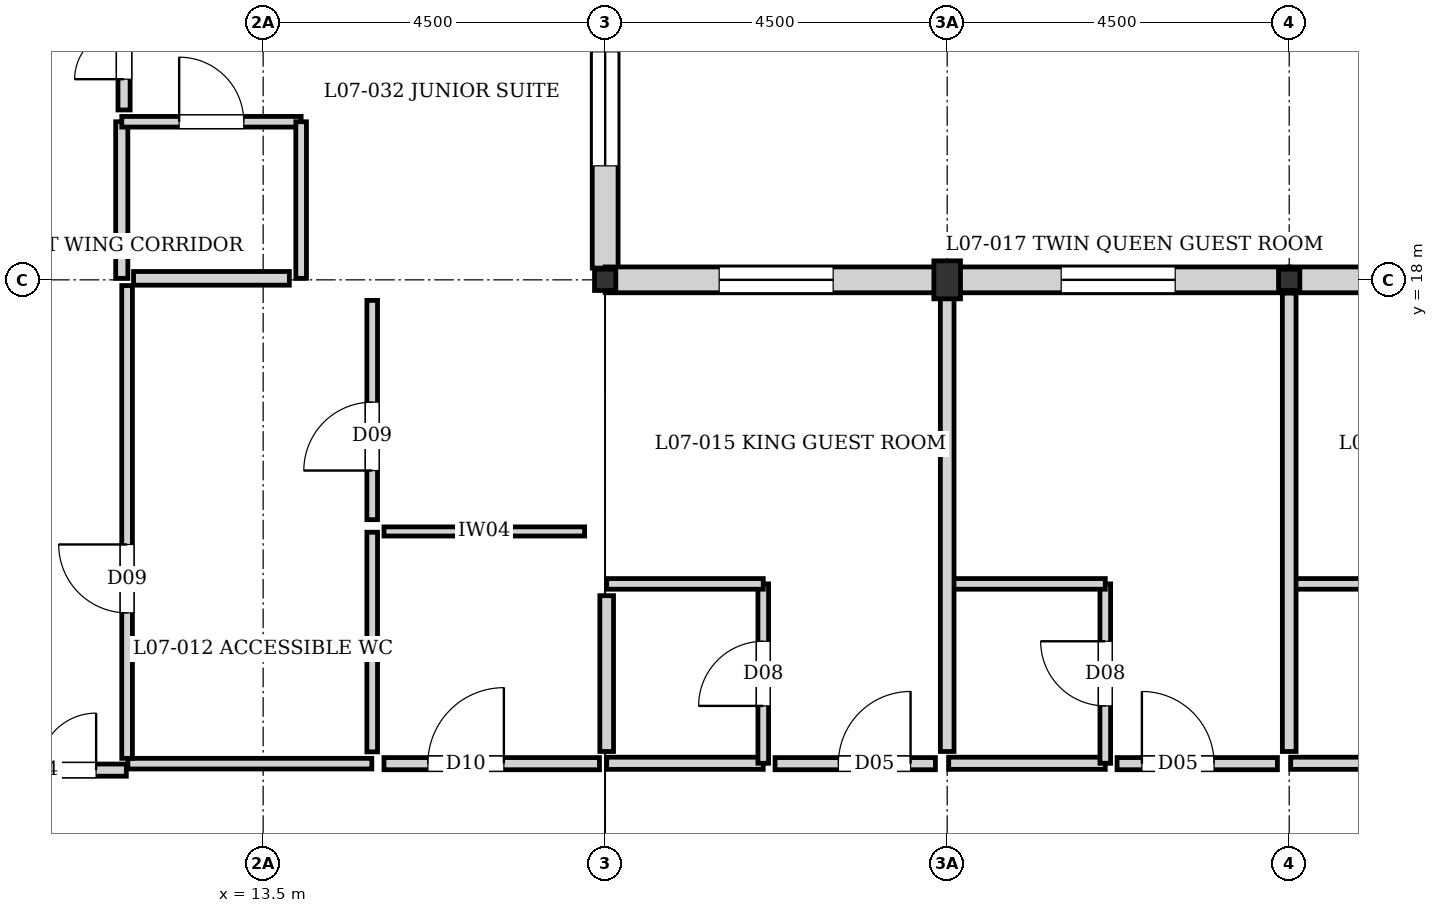
"""IFC4 building model, lengths in metres.
Left out: names, types, materials, properties, quantities, classifications, styles, units other than length and angle.
Written with IfcOpenShell. Run it as: python <this file> out.ifc"""

import sys

from ifc_helpers import new_model, si_unit, direction, frame, frame_2d, origin, origin_2d, place, context, subcontext, project, spatial, rectangle, i_section, extrude, element, fill, save


model = new_model("IFC4")
c1 = context("Model", 3, precision=1e-05, world=origin(), true_north=direction((0.0, 1.0)))
c2 = subcontext(c1, "Body", "Model", "MODEL_VIEW")
j1 = project(units=[si_unit("LENGTHUNIT", "METRE"), si_unit("PLANEANGLEUNIT", "RADIAN")], contexts=[c1])
p1 = place(None, origin())
s1 = spatial("IfcSite", under=j1, at=p1, CompositionType="ELEMENT")
p2 = place(p1, origin())
s2 = spatial("IfcBuilding", under=s1, at=p2, CompositionType="ELEMENT")
p3 = place(p2, frame((0.0, 0.0, 23.68)))
s3 = spatial("IfcBuildingStorey", under=s2, at=p3, CompositionType="ELEMENT", Elevation=23.68)
for number, where, z_axis, x_axis in (
    (1, (18.0, 18.0, 0.0), (0.0, 0.0, 1.0), (1.0, 0.0, 0.0)),
    (2, (27.0, 18.0, 0.0), (0.0, 0.0, 1.0), (1.0, 0.0, 0.0)),
):
    element("IfcColumn", number, at=place(p3, frame(where, z_axis=z_axis, x_axis=x_axis)), inside=s3, PredefinedType="COLUMN", context=c2, shape_type="SweptSolid", body=[
        extrude(i_section(OverallWidth=0.28, OverallDepth=0.28, WebThickness=0.01, FlangeThickness=0.018, at=origin_2d()), origin(), (0.0, 0.0, 1.0), 3.2),
    ])
p4 = place(p3, frame((22.5, 18.0, 0.0), z_axis=(0.0, 0.0, 1.0), x_axis=(1.0, 0.0, 0.0)))
e3 = element("IfcColumn", 3, at=p4, inside=s3, PredefinedType="PILASTER", context=c2, shape_type="SweptSolid", body=[
    extrude(rectangle(XDim=0.35, YDim=0.5, at=origin_2d()), origin(), (0.0, 0.0, 1.0), 3.2),
])
p5 = place(p3, frame((18.0, 27.0, 0.0), z_axis=(0.0, 0.0, 1.0), x_axis=(0.0, -1.0, 0.0)))
e4 = element("IfcWall", 4, at=p5, inside=s3, PredefinedType="SOLIDWALL", context=c2, shape_type="SweptSolid", body=[
    extrude(rectangle(XDim=8.845, YDim=0.34, at=frame_2d((4.422, 0.0))), origin(), (0.0, 0.0, 1.0), 2.96),
])
p6 = place(p5, frame((1.5, 0.0, 0.35)))
e5 = element("IfcOpeningElement", 5, at=p6, cuts=e4, PredefinedType="OPENING", context=c2, shape_type="SweptSolid", body=[
    extrude(rectangle(XDim=1.5, YDim=1.8, at=frame_2d((0.75, 0.9))), frame((0.0, 0.18, 0.0), z_axis=(0.0, -1.0, 0.0), x_axis=(1.0, 0.0, 0.0)), (0.0, 0.0, 1.0), 0.36),
])
p7 = place(p5, frame((6.0, 0.0, 0.35)))
e6 = element("IfcOpeningElement", 6, at=p7, cuts=e4, PredefinedType="OPENING", context=c2, shape_type="SweptSolid", body=[
    extrude(rectangle(XDim=1.5, YDim=1.8, at=frame_2d((0.75, 0.9))), frame((0.0, 0.18, 0.0), z_axis=(0.0, -1.0, 0.0), x_axis=(1.0, 0.0, 0.0)), (0.0, 0.0, 1.0), 0.36),
])
p8 = place(p3, frame((18.0, 18.0, 0.0), z_axis=(0.0, 0.0, 1.0), x_axis=(1.0, 0.0, 0.0)))
e7 = element("IfcWall", 7, at=p8, inside=s3, PredefinedType="SOLIDWALL", context=c2, shape_type="SweptSolid", body=[
    extrude(rectangle(XDim=9.0, YDim=0.34, at=frame_2d((4.5, 0.0))), origin(), (0.0, 0.0, 1.0), 2.56),
])
p9 = place(p8, frame((1.5, 0.0, 0.35)))
e8 = element("IfcOpeningElement", 8, at=p9, cuts=e7, PredefinedType="OPENING", context=c2, shape_type="SweptSolid", body=[
    extrude(rectangle(XDim=1.5, YDim=1.8, at=frame_2d((0.75, 0.9))), frame((0.0, 0.18, 0.0), z_axis=(0.0, -1.0, 0.0), x_axis=(1.0, 0.0, 0.0)), (0.0, 0.0, 1.0), 0.36),
])
p10 = place(p8, frame((6.0, 0.0, 0.35)))
e9 = element("IfcOpeningElement", 9, at=p10, cuts=e7, PredefinedType="OPENING", context=c2, shape_type="SweptSolid", body=[
    extrude(rectangle(XDim=1.5, YDim=1.8, at=frame_2d((0.75, 0.9))), frame((0.0, 0.18, 0.0), z_axis=(0.0, -1.0, 0.0), x_axis=(1.0, 0.0, 0.0)), (0.0, 0.0, 1.0), 0.36),
])
p11 = place(p3, frame((27.0, 18.0, 0.0), z_axis=(0.0, 0.0, 1.0), x_axis=(1.0, 0.0, 0.0)))
e10 = element("IfcWall", 10, at=p11, inside=s3, PredefinedType="SOLIDWALL", context=c2, shape_type="SweptSolid", body=[
    extrude(rectangle(XDim=9.0, YDim=0.34, at=frame_2d((4.5, 0.0))), origin(), (0.0, 0.0, 1.0), 2.73),
])
p12 = place(p11, frame((1.5, 0.0, 0.35)))
e11 = element("IfcOpeningElement", 11, at=p12, cuts=e10, PredefinedType="OPENING", context=c2, shape_type="SweptSolid", body=[
    extrude(rectangle(XDim=1.5, YDim=1.8, at=frame_2d((0.75, 0.9))), frame((0.0, 0.18, 0.0), z_axis=(0.0, -1.0, 0.0), x_axis=(1.0, 0.0, 0.0)), (0.0, 0.0, 1.0), 0.36),
])
p13 = place(p11, frame((6.0, 0.0, 0.35)))
e12 = element("IfcOpeningElement", 12, at=p13, cuts=e10, PredefinedType="OPENING", context=c2, shape_type="SweptSolid", body=[
    extrude(rectangle(XDim=1.5, YDim=1.8, at=frame_2d((0.75, 0.9))), frame((0.0, 0.18, 0.0), z_axis=(0.0, -1.0, 0.0), x_axis=(1.0, 0.0, 0.0)), (0.0, 0.0, 1.0), 0.36),
])
p14 = place(p3, frame((18.02, 11.64, 0.0), z_axis=(0.0, 0.0, 1.0), x_axis=(1.0, 0.0, 0.0)))
e13 = element("IfcWall", 13, at=p14, inside=s3, PredefinedType="PARTITIONING", context=c2, shape_type="SweptSolid", body=[
    extrude(rectangle(XDim=2.06, YDim=0.16, at=frame_2d((1.03, 0.0))), origin(), (0.0, 0.0, 1.0), 2.96),
])
p15 = place(p3, frame((20.08, 11.64, 0.0), z_axis=(0.0, 0.0, 1.0), x_axis=(0.0, 1.0, 0.0)))
e14 = element("IfcWall", 14, at=p15, inside=s3, PredefinedType="PLUMBINGWALL", context=c2, shape_type="SweptSolid", body=[
    extrude(rectangle(XDim=2.36, YDim=0.14, at=frame_2d((1.18, 0.0))), origin(), (0.0, 0.0, 1.0), 2.96),
])
p16 = place(p15, frame((0.755, 0.0, 0.0)))
e15 = element("IfcOpeningElement", 15, at=p16, cuts=e14, PredefinedType="OPENING", context=c2, shape_type="SweptSolid", body=[
    extrude(rectangle(XDim=0.85, YDim=2.04, at=frame_2d((0.425, 1.02))), frame((0.0, 0.08, 0.0), z_axis=(0.0, -1.0, 0.0), x_axis=(1.0, 0.0, 0.0)), (0.0, 0.0, 1.0), 0.16),
])
p17 = place(p3, frame((18.02, 14.0, 0.0), z_axis=(0.0, 0.0, 1.0), x_axis=(1.0, 0.0, 0.0)))
e16 = element("IfcWall", 16, at=p17, inside=s3, PredefinedType="PLUMBINGWALL", context=c2, shape_type="SweptSolid", body=[
    extrude(rectangle(XDim=2.06, YDim=0.14, at=frame_2d((1.03, 0.0))), origin(), (0.0, 0.0, 1.0), 2.96),
])
p18 = place(p3, frame((22.52, 11.64, 0.0), z_axis=(0.0, 0.0, 1.0), x_axis=(1.0, 0.0, 0.0)))
e17 = element("IfcWall", 17, at=p18, inside=s3, PredefinedType="PARTITIONING", context=c2, shape_type="SweptSolid", body=[
    extrude(rectangle(XDim=2.06, YDim=0.16, at=frame_2d((1.03, 0.0))), origin(), (0.0, 0.0, 1.0), 2.96),
])
p19 = place(p3, frame((24.58, 11.64, 0.0), z_axis=(0.0, 0.0, 1.0), x_axis=(0.0, 1.0, 0.0)))
e18 = element("IfcWall", 18, at=p19, inside=s3, PredefinedType="PLUMBINGWALL", context=c2, shape_type="SweptSolid", body=[
    extrude(rectangle(XDim=2.36, YDim=0.14, at=frame_2d((1.18, 0.0))), origin(), (0.0, 0.0, 1.0), 2.96),
])
p20 = place(p19, frame((0.755, 0.0, 0.0)))
e19 = element("IfcOpeningElement", 19, at=p20, cuts=e18, PredefinedType="OPENING", context=c2, shape_type="SweptSolid", body=[
    extrude(rectangle(XDim=0.85, YDim=2.04, at=frame_2d((0.425, 1.02))), frame((0.0, 0.08, 0.0), z_axis=(0.0, -1.0, 0.0), x_axis=(1.0, 0.0, 0.0)), (0.0, 0.0, 1.0), 0.16),
])
p21 = place(p3, frame((22.52, 14.0, 0.0), z_axis=(0.0, 0.0, 1.0), x_axis=(1.0, 0.0, 0.0)))
e20 = element("IfcWall", 20, at=p21, inside=s3, PredefinedType="PLUMBINGWALL", context=c2, shape_type="SweptSolid", body=[
    extrude(rectangle(XDim=2.06, YDim=0.14, at=frame_2d((1.03, 0.0))), origin(), (0.0, 0.0, 1.0), 2.96),
])
p22 = place(p3, frame((27.02, 11.64, 0.0), z_axis=(0.0, 0.0, 1.0), x_axis=(1.0, 0.0, 0.0)))
e21 = element("IfcWall", 21, at=p22, inside=s3, PredefinedType="PARTITIONING", context=c2, shape_type="SweptSolid", body=[
    extrude(rectangle(XDim=2.06, YDim=0.16, at=frame_2d((1.03, 0.0))), origin(), (0.0, 0.0, 1.0), 2.96),
])
p23 = place(p3, frame((27.02, 14.0, 0.0), z_axis=(0.0, 0.0, 1.0), x_axis=(1.0, 0.0, 0.0)))
e22 = element("IfcWall", 22, at=p23, inside=s3, PredefinedType="PLUMBINGWALL", context=c2, shape_type="SweptSolid", body=[
    extrude(rectangle(XDim=2.06, YDim=0.14, at=frame_2d((1.03, 0.0))), origin(), (0.0, 0.0, 1.0), 2.96),
])
p24 = place(p3, frame((11.64, 18.02, 0.0), z_axis=(0.0, 0.0, 1.0), x_axis=(0.0, 1.0, 0.0)))
e23 = element("IfcWall", 23, at=p24, inside=s3, PredefinedType="PARTITIONING", context=c2, shape_type="SweptSolid", body=[
    extrude(rectangle(XDim=2.06, YDim=0.16, at=frame_2d((1.03, 0.0))), origin(), (0.0, 0.0, 1.0), 2.96),
])
p25 = place(p3, frame((11.64, 20.08, 0.0), z_axis=(0.0, 0.0, 1.0), x_axis=(1.0, 0.0, 0.0)))
e24 = element("IfcWall", 24, at=p25, inside=s3, PredefinedType="PLUMBINGWALL", context=c2, shape_type="SweptSolid", body=[
    extrude(rectangle(XDim=2.36, YDim=0.14, at=frame_2d((1.18, 0.0))), origin(), (0.0, 0.0, 1.0), 2.96),
])
p26 = place(p25, frame((0.755, 0.0, 0.0)))
e25 = element("IfcOpeningElement", 25, at=p26, cuts=e24, PredefinedType="OPENING", context=c2, shape_type="SweptSolid", body=[
    extrude(rectangle(XDim=0.85, YDim=2.04, at=frame_2d((0.425, 1.02))), frame((0.0, 0.08, 0.0), z_axis=(0.0, -1.0, 0.0), x_axis=(1.0, 0.0, 0.0)), (0.0, 0.0, 1.0), 0.16),
])
p27 = place(p3, frame((14.0, 18.02, 0.0), z_axis=(0.0, 0.0, 1.0), x_axis=(0.0, 1.0, 0.0)))
e26 = element("IfcWall", 26, at=p27, inside=s3, PredefinedType="PLUMBINGWALL", context=c2, shape_type="SweptSolid", body=[
    extrude(rectangle(XDim=2.06, YDim=0.14, at=frame_2d((1.03, 0.0))), origin(), (0.0, 0.0, 1.0), 2.96),
])
p28 = place(p3, frame((22.5, 11.795, 0.0), z_axis=(0.0, 0.0, 1.0), x_axis=(0.0, 1.0, 0.0)))
e27 = element("IfcWall", 27, at=p28, inside=s3, PredefinedType="PARTITIONING", context=c2, shape_type="SweptSolid", body=[
    extrude(rectangle(XDim=6.03, YDim=0.18, at=frame_2d((3.015, 0.0))), origin(), (0.0, 0.0, 1.0), 2.96),
])
p29 = place(p3, frame((27.0, 11.795, 0.0), z_axis=(0.0, 0.0, 1.0), x_axis=(0.0, 1.0, 0.0)))
e28 = element("IfcWall", 28, at=p29, inside=s3, PredefinedType="PARTITIONING", context=c2, shape_type="SweptSolid", body=[
    extrude(rectangle(XDim=6.03, YDim=0.18, at=frame_2d((3.015, 0.0))), origin(), (0.0, 0.0, 1.0), 2.27),
])
p30 = place(p3, frame((18.02, 11.795, 0.0), z_axis=(0.0, 0.0, 1.0), x_axis=(0.0, 1.0, 0.0)))
e29 = element("IfcWall", 29, at=p30, inside=s3, PredefinedType="PARTITIONING", context=c2, shape_type="SweptSolid", body=[
    extrude(rectangle(XDim=2.05, YDim=0.18, at=frame_2d((1.025, 0.0))), origin(), (0.0, 0.0, 1.0), 2.56),
])
p31 = place(p3, frame((11.795, 18.02, 0.0), z_axis=(0.0, 0.0, 1.0), x_axis=(1.0, 0.0, 0.0)))
e30 = element("IfcWall", 30, at=p31, inside=s3, PredefinedType="PARTITIONING", context=c2, shape_type="SweptSolid", body=[
    extrude(rectangle(XDim=2.05, YDim=0.18, at=frame_2d((1.025, 0.0))), origin(), (0.0, 0.0, 1.0), 2.6),
])
p32 = place(p3, frame((11.72, 11.635, 0.0), z_axis=(0.0, 0.0, 1.0), x_axis=(1.0, 0.0, 0.0)))
e31 = element("IfcWall", 31, at=p32, inside=s3, PredefinedType="PLUMBINGWALL", context=c2, shape_type="SweptSolid", body=[
    extrude(rectangle(XDim=3.21, YDim=0.14, at=frame_2d((1.605, 0.0))), origin(), (0.0, 0.0, 1.0), 2.96),
])
p33 = place(p3, frame((14.935, 11.79, 0.0), z_axis=(0.0, 0.0, 1.0), x_axis=(0.0, 1.0, 0.0)))
e32 = element("IfcWall", 32, at=p33, inside=s3, PredefinedType="PLUMBINGWALL", context=c2, shape_type="SweptSolid", body=[
    extrude(rectangle(XDim=2.89, YDim=0.14, at=frame_2d((1.445, 0.0))), origin(), (0.0, 0.0, 1.0), 2.96),
])
p34 = place(p3, frame((15.09, 14.69, 0.0), z_axis=(0.0, 0.0, 1.0), x_axis=(1.0, 0.0, 0.0)))
e33 = element("IfcWall", 33, at=p34, inside=s3, PredefinedType="PARTITIONING", context=c2, shape_type="SweptSolid", body=[
    extrude(rectangle(XDim=2.64, YDim=0.12, at=frame_2d((1.32, 0.0))), origin(), (0.0, 0.0, 1.0), 2.96),
])
p35 = place(p3, frame((9.405, 11.55, 0.0), z_axis=(0.0, 0.0, 1.0), x_axis=(1.0, 0.0, 0.0)))
e34 = element("IfcWall", 34, at=p35, inside=s3, PredefinedType="PARTITIONING", context=c2, shape_type="SweptSolid", body=[
    extrude(rectangle(XDim=2.295, YDim=0.16, at=frame_2d((1.147, 0.0))), origin(), (0.0, 0.0, 1.0), 2.96),
])
p36 = place(p35, frame((0.397, 0.0, 0.0)))
e35 = element("IfcOpeningElement", 35, at=p36, cuts=e34, PredefinedType="OPENING", context=c2, shape_type="SweptSolid", body=[
    extrude(rectangle(XDim=1.5, YDim=2.1, at=frame_2d((0.75, 1.05))), frame((0.0, 0.09, 0.0), z_axis=(0.0, -1.0, 0.0), x_axis=(1.0, 0.0, 0.0)), (0.0, 0.0, 1.0), 0.18),
])
p37 = place(p3, frame((15.09, 11.635, 0.0), z_axis=(0.0, 0.0, 1.0), x_axis=(1.0, 0.0, 0.0)))
e36 = element("IfcWall", 36, at=p37, inside=s3, PredefinedType="PARTITIONING", context=c2, shape_type="SweptSolid", body=[
    extrude(rectangle(XDim=2.835, YDim=0.16, at=frame_2d((1.417, 0.0))), origin(), (0.0, 0.0, 1.0), 2.96),
])
p38 = place(p37, frame((0.577, 0.0, 0.0)))
e37 = element("IfcOpeningElement", 37, at=p38, cuts=e36, PredefinedType="OPENING", context=c2, shape_type="SweptSolid", body=[
    extrude(rectangle(XDim=1.0, YDim=2.1, at=frame_2d((0.5, 1.05))), frame((0.0, 0.09, 0.0), z_axis=(0.0, -1.0, 0.0), x_axis=(1.0, 0.0, 0.0)), (0.0, 0.0, 1.0), 0.18),
])
p39 = place(p3, frame((20.235, 11.635, 0.0), z_axis=(0.0, 0.0, 1.0), x_axis=(1.0, 0.0, 0.0)))
e38 = element("IfcWall", 38, at=p39, inside=s3, PredefinedType="PARTITIONING", context=c2, shape_type="SweptSolid", body=[
    extrude(rectangle(XDim=2.11, YDim=0.16, at=frame_2d((1.055, 0.0))), origin(), (0.0, 0.0, 1.0), 2.96),
])
p40 = place(p39, frame((0.833, 0.0, 0.0)))
e39 = element("IfcOpeningElement", 39, at=p40, cuts=e38, PredefinedType="OPENING", context=c2, shape_type="SweptSolid", body=[
    extrude(rectangle(XDim=0.95, YDim=2.15, at=frame_2d((0.475, 1.075))), frame((0.0, 0.09, 0.0), z_axis=(0.0, -1.0, 0.0), x_axis=(1.0, 0.0, 0.0)), (0.0, 0.0, 1.0), 0.18),
])
p41 = place(p3, frame((24.735, 11.635, 0.0), z_axis=(0.0, 0.0, 1.0), x_axis=(1.0, 0.0, 0.0)))
e40 = element("IfcWall", 40, at=p41, inside=s3, PredefinedType="PARTITIONING", context=c2, shape_type="SweptSolid", body=[
    extrude(rectangle(XDim=2.11, YDim=0.16, at=frame_2d((1.055, 0.0))), origin(), (0.0, 0.0, 1.0), 2.96),
])
p42 = place(p41, frame((0.327, 0.0, 0.0)))
e41 = element("IfcOpeningElement", 41, at=p42, cuts=e40, PredefinedType="OPENING", context=c2, shape_type="SweptSolid", body=[
    extrude(rectangle(XDim=0.95, YDim=2.15, at=frame_2d((0.475, 1.075))), frame((0.0, 0.09, 0.0), z_axis=(0.0, -1.0, 0.0), x_axis=(1.0, 0.0, 0.0)), (0.0, 0.0, 1.0), 0.18),
])
p43 = place(p3, frame((11.71, 11.705, 0.0), z_axis=(0.0, 0.0, 1.0), x_axis=(0.0, 1.0, 0.0)))
e42 = element("IfcWall", 42, at=p43, inside=s3, PredefinedType="PLUMBINGWALL", context=c2, shape_type="SweptSolid", body=[
    extrude(rectangle(XDim=6.22, YDim=0.14, at=frame_2d((3.11, 0.0))), origin(), (0.0, 0.0, 1.0), 2.96),
])
p44 = place(p43, frame((1.914, 0.0, 0.0)))
e43 = element("IfcOpeningElement", 43, at=p44, cuts=e42, PredefinedType="OPENING", context=c2, shape_type="SweptSolid", body=[
    extrude(rectangle(XDim=0.9, YDim=2.1, at=frame_2d((0.45, 1.05))), frame((0.0, 0.08, 0.0), z_axis=(0.0, -1.0, 0.0), x_axis=(1.0, 0.0, 0.0)), (0.0, 0.0, 1.0), 0.16),
])
p45 = place(p3, frame((11.67, 20.235, 0.0), z_axis=(0.0, 0.0, 1.0), x_axis=(0.0, 1.0, 0.0)))
e44 = element("IfcWall", 44, at=p45, inside=s3, PredefinedType="PARTITIONING", context=c2, shape_type="SweptSolid", body=[
    extrude(rectangle(XDim=2.11, YDim=0.16, at=frame_2d((1.055, 0.0))), origin(), (0.0, 0.0, 1.0), 2.96),
])
p46 = place(p45, frame((0.405, 0.0, 0.0)))
e45 = element("IfcOpeningElement", 45, at=p46, cuts=e44, PredefinedType="OPENING", context=c2, shape_type="SweptSolid", body=[
    extrude(rectangle(XDim=1.3, YDim=2.25, at=frame_2d((0.65, 1.125))), frame((0.0, 0.09, 0.0), z_axis=(0.0, -1.0, 0.0), x_axis=(1.0, 0.0, 0.0)), (0.0, 0.0, 1.0), 0.18),
])
p47 = place(p3, frame((14.935, 14.845, 0.0), z_axis=(0.0, 0.0, 1.0), x_axis=(0.0, 1.0, 0.0)))
e46 = element("IfcWall", 46, at=p47, inside=s3, PredefinedType="PLUMBINGWALL", context=c2, shape_type="SweptSolid", body=[
    extrude(rectangle(XDim=2.885, YDim=0.14, at=frame_2d((1.442, 0.0))), origin(), (0.0, 0.0, 1.0), 2.96),
])
p48 = place(p47, frame((0.646, 0.0, 0.0)))
e47 = element("IfcOpeningElement", 47, at=p48, cuts=e46, PredefinedType="OPENING", context=c2, shape_type="SweptSolid", body=[
    extrude(rectangle(XDim=0.9, YDim=2.1, at=frame_2d((0.45, 1.05))), frame((0.0, 0.08, 0.0), z_axis=(0.0, -1.0, 0.0), x_axis=(1.0, 0.0, 0.0)), (0.0, 0.0, 1.0), 0.16),
])
p49 = place(p7, origin())
e48 = element("IfcWindow", 48, at=p49, inside=s3, PartitioningType="SINGLE_PANEL", PredefinedType="WINDOW", context=c2, shape_type="SweptSolid", body=[
    extrude(rectangle(XDim=1.5, YDim=1.8, at=frame_2d((0.75, 0.9))), frame((0.0, 0.03, 0.0), z_axis=(0.0, -1.0, 0.0), x_axis=(1.0, 0.0, 0.0)), (0.0, 0.0, 1.0), 0.06),
])
fill(e6, e48)
p50 = place(p9, origin())
e49 = element("IfcWindow", 49, at=p50, inside=s3, PartitioningType="SINGLE_PANEL", PredefinedType="WINDOW", context=c2, shape_type="SweptSolid", body=[
    extrude(rectangle(XDim=1.5, YDim=1.8, at=frame_2d((0.75, 0.9))), frame((0.0, 0.03, 0.0), z_axis=(0.0, -1.0, 0.0), x_axis=(1.0, 0.0, 0.0)), (0.0, 0.0, 1.0), 0.06),
])
fill(e8, e49)
p51 = place(p10, origin())
e50 = element("IfcWindow", 50, at=p51, inside=s3, PartitioningType="SINGLE_PANEL", PredefinedType="WINDOW", context=c2, shape_type="SweptSolid", body=[
    extrude(rectangle(XDim=1.5, YDim=1.8, at=frame_2d((0.75, 0.9))), frame((0.0, 0.03, 0.0), z_axis=(0.0, -1.0, 0.0), x_axis=(1.0, 0.0, 0.0)), (0.0, 0.0, 1.0), 0.06),
])
fill(e9, e50)
p52 = place(p16, origin())
e51 = element("IfcDoor", 51, at=p52, inside=s3, OperationType="SINGLE_SWING_LEFT", PredefinedType="DOOR", context=c2, shape_type="SweptSolid", body=[
    extrude(rectangle(XDim=0.85, YDim=2.04, at=frame_2d((0.425, 1.02))), frame((0.0, 0.025, 0.0), z_axis=(0.0, -1.0, 0.0), x_axis=(1.0, 0.0, 0.0)), (0.0, 0.0, 1.0), 0.05),
])
fill(e15, e51)
p53 = place(p20, origin())
e52 = element("IfcDoor", 52, at=p53, inside=s3, OperationType="SINGLE_SWING_RIGHT", PredefinedType="DOOR", context=c2, shape_type="SweptSolid", body=[
    extrude(rectangle(XDim=0.85, YDim=2.04, at=frame_2d((0.425, 1.02))), frame((0.0, 0.025, 0.0), z_axis=(0.0, -1.0, 0.0), x_axis=(1.0, 0.0, 0.0)), (0.0, 0.0, 1.0), 0.05),
])
fill(e19, e52)
p54 = place(p26, origin())
e53 = element("IfcDoor", 53, at=p54, inside=s3, OperationType="SINGLE_SWING_LEFT", PredefinedType="DOOR", context=c2, shape_type="SweptSolid", body=[
    extrude(rectangle(XDim=0.85, YDim=2.04, at=frame_2d((0.425, 1.02))), frame((0.0, 0.025, 0.0), z_axis=(0.0, -1.0, 0.0), x_axis=(1.0, 0.0, 0.0)), (0.0, 0.0, 1.0), 0.05),
])
fill(e25, e53)
p55 = place(p36, origin())
e54 = element("IfcDoor", 54, at=p55, inside=s3, OperationType="DOUBLE_DOOR_SINGLE_SWING", PredefinedType="DOOR", context=c2, shape_type="SweptSolid", body=[
    extrude(rectangle(XDim=1.5, YDim=2.1, at=frame_2d((0.75, 1.05))), frame((0.0, 0.025, 0.0), z_axis=(0.0, -1.0, 0.0), x_axis=(1.0, 0.0, 0.0)), (0.0, 0.0, 1.0), 0.05),
])
fill(e35, e54)
p56 = place(p38, origin())
e55 = element("IfcDoor", 55, at=p56, inside=s3, OperationType="SINGLE_SWING_RIGHT", PredefinedType="DOOR", context=c2, shape_type="SweptSolid", body=[
    extrude(rectangle(XDim=1.0, YDim=2.1, at=frame_2d((0.5, 1.05))), frame((0.0, 0.025, 0.0), z_axis=(0.0, -1.0, 0.0), x_axis=(1.0, 0.0, 0.0)), (0.0, 0.0, 1.0), 0.05),
])
fill(e37, e55)
p57 = place(p40, origin())
e56 = element("IfcDoor", 56, at=p57, inside=s3, OperationType="SINGLE_SWING_RIGHT", PredefinedType="DOOR", context=c2, shape_type="SweptSolid", body=[
    extrude(rectangle(XDim=0.95, YDim=2.15, at=frame_2d((0.475, 1.075))), frame((0.0, 0.025, 0.0), z_axis=(0.0, -1.0, 0.0), x_axis=(1.0, 0.0, 0.0)), (0.0, 0.0, 1.0), 0.05),
])
fill(e39, e56)
p58 = place(p42, origin())
e57 = element("IfcDoor", 57, at=p58, inside=s3, OperationType="SINGLE_SWING_LEFT", PredefinedType="DOOR", context=c2, shape_type="SweptSolid", body=[
    extrude(rectangle(XDim=0.95, YDim=2.15, at=frame_2d((0.475, 1.075))), frame((0.0, 0.025, 0.0), z_axis=(0.0, -1.0, 0.0), x_axis=(1.0, 0.0, 0.0)), (0.0, 0.0, 1.0), 0.05),
])
fill(e41, e57)
p59 = place(p44, origin())
e58 = element("IfcDoor", 58, at=p59, inside=s3, OperationType="SINGLE_SWING_RIGHT", PredefinedType="DOOR", context=c2, shape_type="SweptSolid", body=[
    extrude(rectangle(XDim=0.9, YDim=2.1, at=frame_2d((0.45, 1.05))), frame((0.0, 0.025, 0.0), z_axis=(0.0, -1.0, 0.0), x_axis=(1.0, 0.0, 0.0)), (0.0, 0.0, 1.0), 0.05),
])
fill(e43, e58)
p60 = place(p46, origin())
e59 = element("IfcDoor", 59, at=p60, inside=s3, OperationType="DOUBLE_DOOR_SINGLE_SWING", PredefinedType="DOOR", context=c2, shape_type="SweptSolid", body=[
    extrude(rectangle(XDim=1.3, YDim=2.25, at=frame_2d((0.65, 1.125))), frame((0.0, 0.025, 0.0), z_axis=(0.0, -1.0, 0.0), x_axis=(1.0, 0.0, 0.0)), (0.0, 0.0, 1.0), 0.05),
])
fill(e45, e59)
p61 = place(p48, origin())
e60 = element("IfcDoor", 60, at=p61, inside=s3, OperationType="SINGLE_SWING_LEFT", PredefinedType="DOOR", context=c2, shape_type="SweptSolid", body=[
    extrude(rectangle(XDim=0.9, YDim=2.1, at=frame_2d((0.45, 1.05))), frame((0.0, 0.025, 0.0), z_axis=(0.0, -1.0, 0.0), x_axis=(1.0, 0.0, 0.0)), (0.0, 0.0, 1.0), 0.05),
])
fill(e47, e60)
save(model, sys.argv[1])
